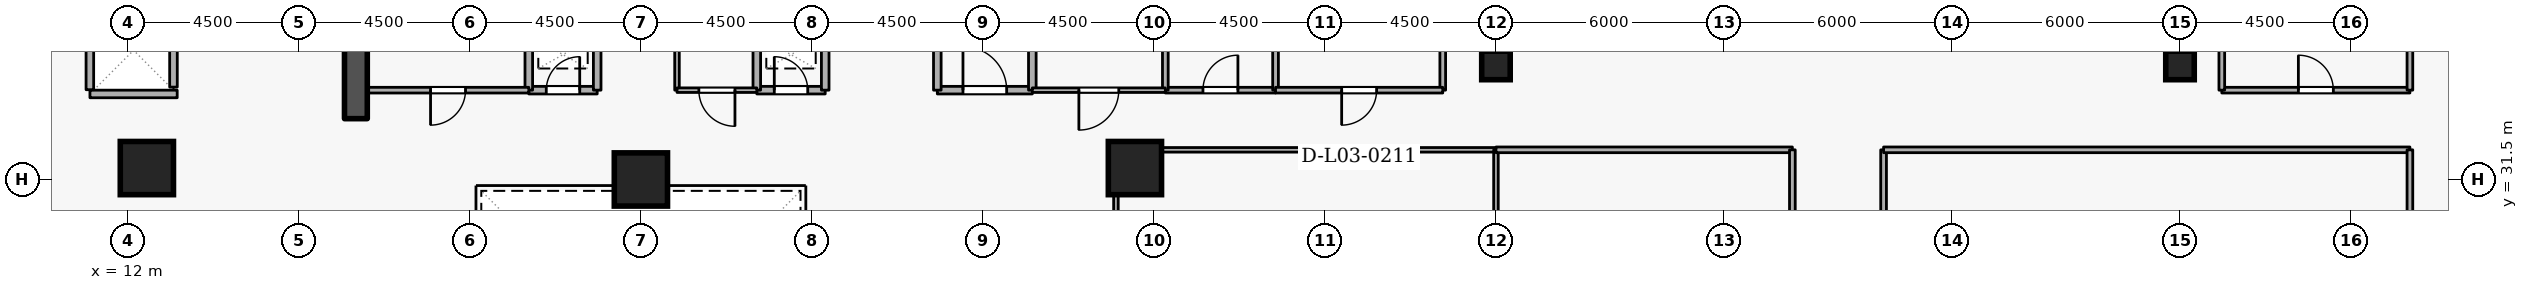
"""IFC4 building model, lengths in metres.
Left out: names, types, materials, properties, quantities, classifications, styles, units other than length and angle.
Written with IfcOpenShell. Run it as: python <this file> out.ifc"""

import sys

from ifc_helpers import new_model, si_unit, direction, frame, frame_2d, origin, origin_2d, place, context, subcontext, project, spatial, rectangle, extrude, element, fill, save


model = new_model("IFC4")
c1 = context("Model", 3, precision=1e-05, world=origin(), true_north=direction((0.0, 1.0)))
c2 = subcontext(c1, "Body", "Model", "MODEL_VIEW")
j1 = project(units=[si_unit("LENGTHUNIT", "METRE"), si_unit("PLANEANGLEUNIT", "RADIAN")], contexts=[c1])
p1 = place(None, origin())
s1 = spatial("IfcSite", under=j1, at=p1, CompositionType="ELEMENT")
p2 = place(p1, origin())
s2 = spatial("IfcBuilding", under=s1, at=p2, CompositionType="ELEMENT")
p3 = place(p2, frame((0.0, 0.0, 14.1)))
s3 = spatial("IfcBuildingStorey", under=s2, at=p3, CompositionType="ELEMENT", Elevation=14.1)
p4 = place(p3, frame((18.0, 33.1, 0.0), z_axis=(0.0, 0.0, 1.0), x_axis=(0.0, 1.0, 0.0)))
e1 = element("IfcWall", 1, at=p4, inside=s3, PredefinedType="SHEAR", context=c2, shape_type="SweptSolid", body=[
    extrude(rectangle(XDim=5.7, YDim=0.6, at=frame_2d((2.85, 0.0))), origin(), (0.0, 0.0, 1.0), 4.5),
])
for number, where, z_axis, x_axis in (
    (2, (12.5, 31.8, 0.0), (0.0, 0.0, 1.0), (1.0, 0.0, 0.0)),
    (3, (38.5, 31.8, 0.0), (0.0, 0.0, 1.0), (1.0, 0.0, 0.0)),
    (4, (25.5, 31.5, 0.0), (0.0, 0.0, 1.0), (1.0, 0.0, 0.0)),
):
    element("IfcColumn", number, at=place(p3, frame(where, z_axis=z_axis, x_axis=x_axis)), inside=s3, PredefinedType="COLUMN", context=c2, shape_type="SweptSolid", body=[
        extrude(rectangle(XDim=1.4, YDim=1.4, at=origin_2d()), origin(), (0.0, 0.0, 1.0), 4.5),
    ])
for number, where, z_axis, x_axis in (
    (5, (48.0, 34.5, 0.0), (0.0, 0.0, 1.0), (1.0, 0.0, 0.0)),
    (6, (66.0, 34.5, 0.0), (0.0, 0.0, 1.0), (1.0, 0.0, 0.0)),
):
    element("IfcColumn", number, at=place(p3, frame(where, z_axis=z_axis, x_axis=x_axis)), inside=s3, PredefinedType="COLUMN", context=c2, shape_type="SweptSolid", body=[
        extrude(rectangle(XDim=0.75, YDim=0.75, at=origin_2d()), origin(), (0.0, 0.0, 1.0), 4.5),
    ])
p5 = place(p3, frame((13.2, 33.93, 0.0), z_axis=(0.0, 0.0, 1.0), x_axis=(0.0, 1.0, 0.0)))
e7 = element("IfcWall", 7, at=p5, inside=s3, PredefinedType="STANDARD", context=c2, shape_type="SweptSolid", body=[
    extrude(rectangle(XDim=1.94, YDim=0.2, at=frame_2d((0.97, 0.0))), origin(), (0.0, 0.0, 1.0), 4.16),
])
p6 = place(p3, frame((11.002, 33.75, 0.0), z_axis=(0.0, 0.0, 1.0), x_axis=(1.0, 0.0, 0.0)))
e8 = element("IfcWall", 8, at=p6, inside=s3, PredefinedType="STANDARD", context=c2, shape_type="SweptSolid", body=[
    extrude(rectangle(XDim=2.296, YDim=0.2, at=frame_2d((1.148, 0.0))), origin(), (0.0, 0.0, 1.0), 4.16),
])
p7 = place(p3, frame((11.0, 33.862, 0.0), z_axis=(0.0, 0.0, 1.0), x_axis=(0.0, 1.0, 0.0)))
e9 = element("IfcWall", 9, at=p7, inside=s3, PredefinedType="STANDARD", context=c2, shape_type="SweptSolid", body=[
    extrude(rectangle(XDim=2.076, YDim=0.2, at=frame_2d((1.038, 0.0))), origin(), (0.0, 0.0, 1.0), 4.16),
])
p8 = place(p3, frame((33.3, 33.85, 0.0), z_axis=(0.0, 0.0, 1.0), x_axis=(1.0, 0.0, 0.0)))
e10 = element("IfcWall", 10, at=p8, inside=s3, PredefinedType="STANDARD", context=c2, shape_type="SweptSolid", body=[
    extrude(rectangle(XDim=2.5, YDim=0.2, at=frame_2d((1.25, 0.0))), origin(), (0.0, 0.0, 1.0), 4.16),
])
p9 = place(p8, frame((0.675, 0.0, 0.0)))
e11 = element("IfcOpeningElement", 11, at=p9, cuts=e10, PredefinedType="OPENING", context=c2, shape_type="SweptSolid", body=[
    extrude(rectangle(XDim=1.15, YDim=2.1, at=frame_2d((0.575, 1.05))), frame((0.0, 0.11, 0.0), z_axis=(0.0, -1.0, 0.0), x_axis=(1.0, 0.0, 0.0)), (0.0, 0.0, 1.0), 0.22),
])
p10 = place(p3, frame((35.8, 33.85, 0.0), z_axis=(0.0, 0.0, 1.0), x_axis=(0.0, 1.0, 0.0)))
e12 = element("IfcWall", 12, at=p10, inside=s3, PredefinedType="STANDARD", context=c2, shape_type="SweptSolid", body=[
    extrude(rectangle(XDim=5.15, YDim=0.2, at=frame_2d((2.575, 0.0))), origin(), (0.0, 0.0, 1.0), 4.16),
])
p11 = place(p3, frame((33.3, 35.6, 0.0), z_axis=(0.0, 0.0, 1.0), x_axis=(0.0, -1.0, 0.0)))
e13 = element("IfcWall", 13, at=p11, inside=s3, PredefinedType="STANDARD", context=c2, shape_type="SweptSolid", body=[
    extrude(rectangle(XDim=1.75, YDim=0.2, at=frame_2d((0.875, 0.0))), origin(), (0.0, 0.0, 1.0), 3.365),
])
p12 = place(p3, frame((22.55, 33.85, 0.0), z_axis=(0.0, 0.0, 1.0), x_axis=(1.0, 0.0, 0.0)))
e14 = element("IfcWall", 14, at=p12, inside=s3, PredefinedType="STANDARD", context=c2, shape_type="SweptSolid", body=[
    extrude(rectangle(XDim=1.8, YDim=0.2, at=frame_2d((0.9, 0.0))), origin(), (0.0, 0.0, 1.0), 4.16),
])
p13 = place(p12, frame((0.46, 0.0, 0.0)))
e15 = element("IfcOpeningElement", 15, at=p13, cuts=e14, PredefinedType="OPENING", context=c2, shape_type="SweptSolid", body=[
    extrude(rectangle(XDim=0.88, YDim=2.04, at=frame_2d((0.44, 1.02))), frame((0.0, 0.11, 0.0), z_axis=(0.0, -1.0, 0.0), x_axis=(1.0, 0.0, 0.0)), (0.0, 0.0, 1.0), 0.22),
])
for number, where, z_axis, x_axis in (
    (16, (24.35, 33.85, 0.0), (0.0, 0.0, 1.0), (0.0, 1.0, 0.0)),
    (17, (22.55, 35.35, 0.0), (0.0, 0.0, 1.0), (0.0, -1.0, 0.0)),
):
    element("IfcWall", number, at=place(p3, frame(where, z_axis=z_axis, x_axis=x_axis)), inside=s3, PredefinedType="STANDARD", context=c2, shape_type="SweptSolid", body=[
        extrude(rectangle(XDim=1.5, YDim=0.2, at=frame_2d((0.75, 0.0))), origin(), (0.0, 0.0, 1.0), 4.16),
    ])
p14 = place(p3, frame((28.55, 33.85, 0.0), z_axis=(0.0, 0.0, 1.0), x_axis=(1.0, 0.0, 0.0)))
e18 = element("IfcWall", 18, at=p14, inside=s3, PredefinedType="STANDARD", context=c2, shape_type="SweptSolid", body=[
    extrude(rectangle(XDim=1.8, YDim=0.2, at=frame_2d((0.9, 0.0))), origin(), (0.0, 0.0, 1.0), 4.16),
])
p15 = place(p14, frame((0.46, 0.0, 0.0)))
e19 = element("IfcOpeningElement", 19, at=p15, cuts=e18, PredefinedType="OPENING", context=c2, shape_type="SweptSolid", body=[
    extrude(rectangle(XDim=0.88, YDim=2.04, at=frame_2d((0.44, 1.02))), frame((0.0, 0.11, 0.0), z_axis=(0.0, -1.0, 0.0), x_axis=(1.0, 0.0, 0.0)), (0.0, 0.0, 1.0), 0.22),
])
for number, where, z_axis, x_axis in (
    (20, (30.35, 33.85, 0.0), (0.0, 0.0, 1.0), (0.0, 1.0, 0.0)),
    (21, (28.55, 35.35, 0.0), (0.0, 0.0, 1.0), (0.0, -1.0, 0.0)),
):
    element("IfcWall", number, at=place(p3, frame(where, z_axis=z_axis, x_axis=x_axis)), inside=s3, PredefinedType="STANDARD", context=c2, shape_type="SweptSolid", body=[
        extrude(rectangle(XDim=1.5, YDim=0.2, at=frame_2d((0.75, 0.0))), origin(), (0.0, 0.0, 1.0), 4.16),
    ])
p16 = place(p3, frame((22.55, 33.85, 0.0), z_axis=(0.0, 0.0, 1.0), x_axis=(-1.0, 0.0, 0.0)))
e22 = element("IfcWall", 22, at=p16, inside=s3, PredefinedType="PARTITIONING", context=c2, shape_type="SweptSolid", body=[
    extrude(rectangle(XDim=4.25, YDim=0.15, at=frame_2d((2.125, 0.0))), origin(), (0.0, 0.0, 1.0), 4.16),
])
p17 = place(p16, frame((1.665, 0.0, 0.0)))
e23 = element("IfcOpeningElement", 23, at=p17, cuts=e22, PredefinedType="OPENING", context=c2, shape_type="SweptSolid", body=[
    extrude(rectangle(XDim=0.92, YDim=2.08, at=frame_2d((0.46, 1.04))), frame((0.0, 0.085, 0.0), z_axis=(0.0, -1.0, 0.0), x_axis=(1.0, 0.0, 0.0)), (0.0, 0.0, 1.0), 0.17),
])
p18 = place(p3, frame((26.45, 33.85, 0.0), z_axis=(0.0, 0.0, 1.0), x_axis=(0.0, 1.0, 0.0)))
e24 = element("IfcWall", 24, at=p18, inside=s3, PredefinedType="PARTITIONING", context=c2, shape_type="SweptSolid", body=[
    extrude(rectangle(XDim=1.5, YDim=0.12, at=frame_2d((0.75, 0.0))), origin(), (0.0, 0.0, 1.0), 4.16),
])
p19 = place(p3, frame((28.55, 33.85, 0.0), z_axis=(0.0, 0.0, 1.0), x_axis=(-1.0, 0.0, 0.0)))
e25 = element("IfcWall", 25, at=p19, inside=s3, PredefinedType="PARTITIONING", context=c2, shape_type="SweptSolid", body=[
    extrude(rectangle(XDim=2.1, YDim=0.12, at=frame_2d((1.05, 0.0))), origin(), (0.0, 0.0, 1.0), 4.16),
])
p20 = place(p19, frame((0.575, 0.0, 0.0)))
e26 = element("IfcOpeningElement", 26, at=p20, cuts=e25, PredefinedType="OPENING", context=c2, shape_type="SweptSolid", body=[
    extrude(rectangle(XDim=0.95, YDim=2.1, at=frame_2d((0.475, 1.05))), frame((0.0, 0.07, 0.0), z_axis=(0.0, -1.0, 0.0), x_axis=(1.0, 0.0, 0.0)), (0.0, 0.0, 1.0), 0.14),
])
p21 = place(p3, frame((39.3, 33.85, 0.0), z_axis=(0.0, 0.0, 1.0), x_axis=(1.0, 0.0, 0.0)))
e27 = element("IfcWall", 27, at=p21, inside=s3, PredefinedType="PARTITIONING", context=c2, shape_type="SweptSolid", body=[
    extrude(rectangle(XDim=2.9, YDim=0.15, at=frame_2d((1.45, 0.0))), origin(), (0.0, 0.0, 1.0), 4.16),
])
p22 = place(p21, frame((0.99, 0.0, 0.0)))
e28 = element("IfcOpeningElement", 28, at=p22, cuts=e27, PredefinedType="OPENING", context=c2, shape_type="SweptSolid", body=[
    extrude(rectangle(XDim=0.92, YDim=2.08, at=frame_2d((0.46, 1.04))), frame((0.0, 0.085, 0.0), z_axis=(0.0, -1.0, 0.0), x_axis=(1.0, 0.0, 0.0)), (0.0, 0.0, 1.0), 0.17),
])
for number, where, z_axis, x_axis in (
    (29, (42.2, 33.85, 0.0), (0.0, 0.0, 1.0), (0.0, 1.0, 0.0)),
    (30, (39.3, 37.8, 0.0), (0.0, 0.0, 1.0), (0.0, -1.0, 0.0)),
):
    element("IfcWall", number, at=place(p3, frame(where, z_axis=z_axis, x_axis=x_axis)), inside=s3, PredefinedType="PARTITIONING", context=c2, shape_type="SweptSolid", body=[
        extrude(rectangle(XDim=3.95, YDim=0.15, at=frame_2d((1.975, 0.0))), origin(), (0.0, 0.0, 1.0), 4.16),
    ])
p23 = place(p3, frame((67.1, 33.85, 0.0), z_axis=(0.0, 0.0, 1.0), x_axis=(1.0, 0.0, 0.0)))
e31 = element("IfcWall", 31, at=p23, inside=s3, PredefinedType="PARTITIONING", context=c2, shape_type="SweptSolid", body=[
    extrude(rectangle(XDim=4.95, YDim=0.15, at=frame_2d((2.475, 0.0))), origin(), (0.0, 0.0, 1.0), 4.16),
])
p24 = place(p23, frame((2.015, 0.0, 0.0)))
e32 = element("IfcOpeningElement", 32, at=p24, cuts=e31, PredefinedType="OPENING", context=c2, shape_type="SweptSolid", body=[
    extrude(rectangle(XDim=0.92, YDim=2.08, at=frame_2d((0.46, 1.04))), frame((0.0, 0.085, 0.0), z_axis=(0.0, -1.0, 0.0), x_axis=(1.0, 0.0, 0.0)), (0.0, 0.0, 1.0), 0.17),
])
for number, where, z_axis, x_axis in (
    (33, (72.05, 33.85, 0.0), (0.0, 0.0, 1.0), (0.0, 1.0, 0.0)),
    (34, (67.1, 37.8, 0.0), (0.0, 0.0, 1.0), (0.0, -1.0, 0.0)),
    (35, (46.6, 37.8, 0.0), (0.0, 0.0, 1.0), (0.0, -1.0, 0.0)),
):
    element("IfcWall", number, at=place(p3, frame(where, z_axis=z_axis, x_axis=x_axis)), inside=s3, PredefinedType="PARTITIONING", context=c2, shape_type="SweptSolid", body=[
        extrude(rectangle(XDim=3.95, YDim=0.15, at=frame_2d((1.975, 0.0))), origin(), (0.0, 0.0, 1.0), 4.16),
    ])
p25 = place(p3, frame((46.6, 33.85, 0.0), z_axis=(0.0, 0.0, 1.0), x_axis=(-1.0, 0.0, 0.0)))
e36 = element("IfcWall", 36, at=p25, inside=s3, PredefinedType="PARTITIONING", context=c2, shape_type="SweptSolid", body=[
    extrude(rectangle(XDim=4.4, YDim=0.15, at=frame_2d((2.2, 0.0))), origin(), (0.0, 0.0, 1.0), 4.16),
])
p26 = place(p25, frame((1.74, 0.0, 0.0)))
e37 = element("IfcOpeningElement", 37, at=p26, cuts=e36, PredefinedType="OPENING", context=c2, shape_type="SweptSolid", body=[
    extrude(rectangle(XDim=0.92, YDim=2.08, at=frame_2d((0.46, 1.04))), frame((0.0, 0.085, 0.0), z_axis=(0.0, -1.0, 0.0), x_axis=(1.0, 0.0, 0.0)), (0.0, 0.0, 1.0), 0.17),
])
p27 = place(p3, frame((38.0, 22.3, 0.0), z_axis=(0.0, 0.0, 1.0), x_axis=(0.0, 1.0, 0.0)))
e38 = element("IfcWall", 38, at=p27, inside=s3, PredefinedType="PARTITIONING", context=c2, shape_type="SweptSolid", body=[
    extrude(rectangle(XDim=9.98, YDim=0.12, at=frame_2d((4.99, 0.0))), origin(), (0.0, 0.0, 1.0), 4.16),
])
p28 = place(p3, frame((38.0, 32.28, 0.0), z_axis=(0.0, 0.0, 1.0), x_axis=(1.0, 0.0, 0.0)))
e39 = element("IfcWall", 39, at=p28, inside=s3, PredefinedType="PARTITIONING", context=c2, shape_type="SweptSolid", body=[
    extrude(rectangle(XDim=10.0, YDim=0.12, at=frame_2d((5.0, 0.0))), origin(), (0.0, 0.0, 1.0), 4.16),
])
p29 = place(p3, frame((48.0, 32.28, 0.0), z_axis=(0.0, 0.0, 1.0), x_axis=(0.0, -1.0, 0.0)))
e40 = element("IfcWall", 40, at=p29, inside=s3, PredefinedType="PARTITIONING", context=c2, shape_type="SweptSolid", body=[
    extrude(rectangle(XDim=9.98, YDim=0.12, at=frame_2d((4.99, 0.0))), origin(), (0.0, 0.0, 1.0), 3.314),
])
p30 = place(p3, frame((58.2, 22.3, 0.0), z_axis=(0.0, 0.0, 1.0), x_axis=(0.0, 1.0, 0.0)))
e41 = element("IfcWall", 41, at=p30, inside=s3, PredefinedType="PARTITIONING", context=c2, shape_type="SweptSolid", body=[
    extrude(rectangle(XDim=9.98, YDim=0.15, at=frame_2d((4.99, 0.0))), origin(), (0.0, 0.0, 1.0), 4.16),
])
p31 = place(p3, frame((58.2, 32.28, 0.0), z_axis=(0.0, 0.0, 1.0), x_axis=(1.0, 0.0, 0.0)))
e42 = element("IfcWall", 42, at=p31, inside=s3, PredefinedType="PARTITIONING", context=c2, shape_type="SweptSolid", body=[
    extrude(rectangle(XDim=13.85, YDim=0.15, at=frame_2d((6.925, 0.0))), origin(), (0.0, 0.0, 1.0), 4.16),
])
p32 = place(p3, frame((72.05, 32.28, 0.0), z_axis=(0.0, 0.0, 1.0), x_axis=(0.0, -1.0, 0.0)))
e43 = element("IfcWall", 43, at=p32, inside=s3, PredefinedType="PARTITIONING", context=c2, shape_type="SweptSolid", body=[
    extrude(rectangle(XDim=9.98, YDim=0.15, at=frame_2d((4.99, 0.0))), origin(), (0.0, 0.0, 1.0), 4.16),
])
p33 = place(p3, frame((39.3, 33.85, 0.0), z_axis=(0.0, 0.0, 1.0), x_axis=(-1.0, 0.0, 0.0)))
e44 = element("IfcWall", 44, at=p33, inside=s3, PredefinedType="PARTITIONING", context=c2, shape_type="SweptSolid", body=[
    extrude(rectangle(XDim=3.5, YDim=0.12, at=frame_2d((1.75, 0.0))), origin(), (0.0, 0.0, 1.0), 4.16),
])
p34 = place(p33, frame((1.225, 0.0, 0.0)))
e45 = element("IfcOpeningElement", 45, at=p34, cuts=e44, PredefinedType="OPENING", context=c2, shape_type="SweptSolid", body=[
    extrude(rectangle(XDim=1.05, YDim=2.1, at=frame_2d((0.525, 1.05))), frame((0.0, 0.07, 0.0), z_axis=(0.0, -1.0, 0.0), x_axis=(1.0, 0.0, 0.0)), (0.0, 0.0, 1.0), 0.14),
])
p35 = place(p3, frame((48.0, 32.28, 0.0), z_axis=(0.0, 0.0, 1.0), x_axis=(1.0, 0.0, 0.0)))
e46 = element("IfcWall", 46, at=p35, inside=s3, PredefinedType="PARTITIONING", context=c2, shape_type="SweptSolid", body=[
    extrude(rectangle(XDim=7.8, YDim=0.15, at=frame_2d((3.9, 0.0))), origin(), (0.0, 0.0, 1.0), 4.16),
])
p36 = place(p3, frame((55.8, 32.28, 0.0), z_axis=(0.0, 0.0, 1.0), x_axis=(0.0, -1.0, 0.0)))
e47 = element("IfcWall", 47, at=p36, inside=s3, PredefinedType="PARTITIONING", context=c2, shape_type="SweptSolid", body=[
    extrude(rectangle(XDim=9.98, YDim=0.15, at=frame_2d((4.99, 0.0))), origin(), (0.0, 0.0, 1.0), 4.16),
])
p37 = place(p36, frame((4.34, 0.0, 0.0)))
e48 = element("IfcOpeningElement", 48, at=p37, cuts=e47, PredefinedType="OPENING", context=c2, shape_type="SweptSolid", body=[
    extrude(rectangle(XDim=1.3, YDim=2.12, at=frame_2d((0.65, 1.06))), frame((0.0, 0.085, 0.0), z_axis=(0.0, -1.0, 0.0), x_axis=(1.0, 0.0, 0.0)), (0.0, 0.0, 1.0), 0.17),
])
p38 = place(p9, origin())
e49 = element("IfcDoor", 49, at=p38, inside=s3, OperationType="SINGLE_SWING_LEFT", PredefinedType="DOOR", context=c2, shape_type="SweptSolid", body=[
    extrude(rectangle(XDim=1.15, YDim=2.1, at=frame_2d((0.575, 1.05))), frame((0.0, 0.025, 0.0), z_axis=(0.0, -1.0, 0.0), x_axis=(1.0, 0.0, 0.0)), (0.0, 0.0, 1.0), 0.05),
])
fill(e11, e49)
p39 = place(p13, origin())
e50 = element("IfcDoor", 50, at=p39, inside=s3, OperationType="SINGLE_SWING_RIGHT", PredefinedType="DOOR", context=c2, shape_type="SweptSolid", body=[
    extrude(rectangle(XDim=0.88, YDim=2.04, at=frame_2d((0.44, 1.02))), frame((0.0, 0.025, 0.0), z_axis=(0.0, -1.0, 0.0), x_axis=(1.0, 0.0, 0.0)), (0.0, 0.0, 1.0), 0.05),
])
fill(e15, e50)
p40 = place(p15, origin())
e51 = element("IfcDoor", 51, at=p40, inside=s3, OperationType="SINGLE_SWING_LEFT", PredefinedType="DOOR", context=c2, shape_type="SweptSolid", body=[
    extrude(rectangle(XDim=0.88, YDim=2.04, at=frame_2d((0.44, 1.02))), frame((0.0, 0.025, 0.0), z_axis=(0.0, -1.0, 0.0), x_axis=(1.0, 0.0, 0.0)), (0.0, 0.0, 1.0), 0.05),
])
fill(e19, e51)
p41 = place(p17, origin())
e52 = element("IfcDoor", 52, at=p41, inside=s3, OperationType="SINGLE_SWING_RIGHT", PredefinedType="DOOR", context=c2, shape_type="SweptSolid", body=[
    extrude(rectangle(XDim=0.92, YDim=2.08, at=frame_2d((0.46, 1.04))), frame((0.0, 0.025, 0.0), z_axis=(0.0, -1.0, 0.0), x_axis=(1.0, 0.0, 0.0)), (0.0, 0.0, 1.0), 0.05),
])
fill(e23, e52)
p42 = place(p20, origin())
e53 = element("IfcDoor", 53, at=p42, inside=s3, OperationType="SINGLE_SWING_LEFT", PredefinedType="DOOR", context=c2, shape_type="SweptSolid", body=[
    extrude(rectangle(XDim=0.95, YDim=2.1, at=frame_2d((0.475, 1.05))), frame((0.0, 0.025, 0.0), z_axis=(0.0, -1.0, 0.0), x_axis=(1.0, 0.0, 0.0)), (0.0, 0.0, 1.0), 0.05),
])
fill(e26, e53)
p43 = place(p22, origin())
e54 = element("IfcDoor", 54, at=p43, inside=s3, OperationType="SINGLE_SWING_RIGHT", PredefinedType="DOOR", context=c2, shape_type="SweptSolid", body=[
    extrude(rectangle(XDim=0.92, YDim=2.08, at=frame_2d((0.46, 1.04))), frame((0.0, 0.025, 0.0), z_axis=(0.0, -1.0, 0.0), x_axis=(1.0, 0.0, 0.0)), (0.0, 0.0, 1.0), 0.05),
])
fill(e28, e54)
p44 = place(p24, origin())
e55 = element("IfcDoor", 55, at=p44, inside=s3, OperationType="SINGLE_SWING_LEFT", PredefinedType="DOOR", context=c2, shape_type="SweptSolid", body=[
    extrude(rectangle(XDim=0.92, YDim=2.08, at=frame_2d((0.46, 1.04))), frame((0.0, 0.025, 0.0), z_axis=(0.0, -1.0, 0.0), x_axis=(1.0, 0.0, 0.0)), (0.0, 0.0, 1.0), 0.05),
])
fill(e32, e55)
p45 = place(p26, origin())
e56 = element("IfcDoor", 56, at=p45, inside=s3, OperationType="SINGLE_SWING_RIGHT", PredefinedType="DOOR", context=c2, shape_type="SweptSolid", body=[
    extrude(rectangle(XDim=0.92, YDim=2.08, at=frame_2d((0.46, 1.04))), frame((0.0, 0.025, 0.0), z_axis=(0.0, -1.0, 0.0), x_axis=(1.0, 0.0, 0.0)), (0.0, 0.0, 1.0), 0.05),
])
fill(e37, e56)
p46 = place(p34, origin())
e57 = element("IfcDoor", 57, at=p46, inside=s3, OperationType="SINGLE_SWING_RIGHT", PredefinedType="DOOR", context=c2, shape_type="SweptSolid", body=[
    extrude(rectangle(XDim=1.05, YDim=2.1, at=frame_2d((0.525, 1.05))), frame((0.0, 0.025, 0.0), z_axis=(0.0, -1.0, 0.0), x_axis=(1.0, 0.0, 0.0)), (0.0, 0.0, 1.0), 0.05),
])
fill(e45, e57)
save(model, sys.argv[1])
